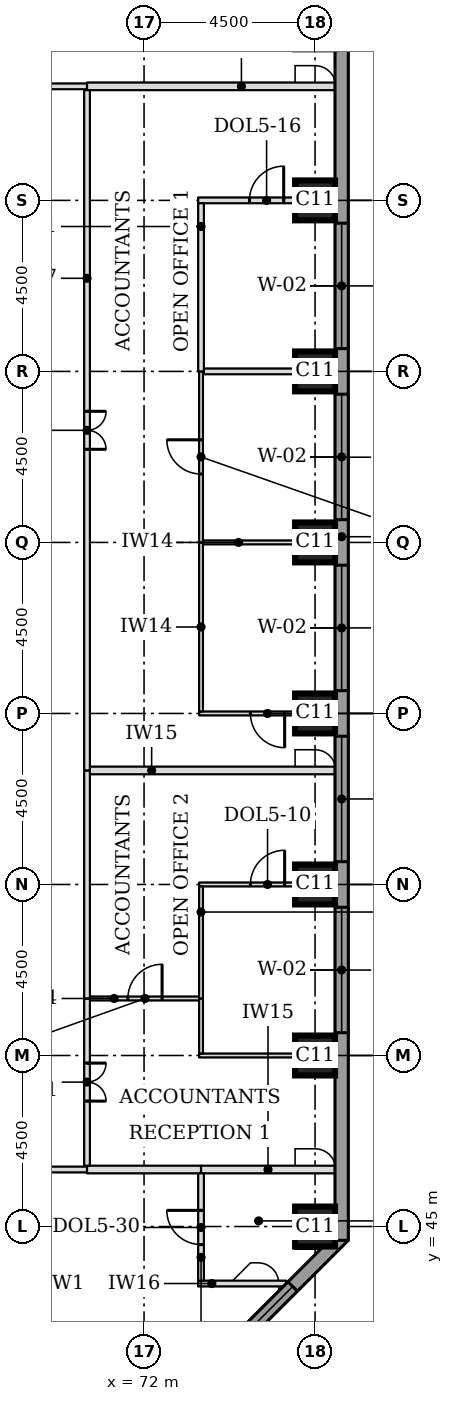
"""IFC4 building model, lengths in metres.
Left out: names, types, materials, properties, quantities, classifications, styles, units other than length and angle.
Written with IfcOpenShell. Run it as: python <this file> out.ifc"""

import sys

from ifc_helpers import new_model, si_unit, direction, frame, frame_2d, origin, origin_2d, place, context, subcontext, project, spatial, rectangle, extrude, element, fill, save


model = new_model("IFC4")
c1 = context("Model", 3, precision=1e-05, world=origin(), true_north=direction((0.0, 1.0)))
c2 = subcontext(c1, "Body", "Model", "MODEL_VIEW")
j1 = project(units=[si_unit("LENGTHUNIT", "METRE"), si_unit("PLANEANGLEUNIT", "RADIAN")], contexts=[c1])
p1 = place(None, origin())
s1 = spatial("IfcSite", under=j1, at=p1, CompositionType="ELEMENT")
p2 = place(p1, origin())
s2 = spatial("IfcBuilding", under=s1, at=p2, CompositionType="ELEMENT")
p3 = place(p2, frame((0.0, 0.0, 108.5)))
s3 = spatial("IfcBuildingStorey", under=s2, at=p3, CompositionType="ELEMENT", Elevation=108.5)
for number, where, z_axis, x_axis in (
    (1, (76.5, 45.0, 0.0), (0.0, 0.0, 1.0), (1.0, 0.0, 0.0)),
    (2, (76.5, 49.5, 0.0), (0.0, 0.0, 1.0), (1.0, 0.0, 0.0)),
    (3, (76.5, 54.0, 0.0), (0.0, 0.0, 1.0), (1.0, 0.0, 0.0)),
    (4, (76.5, 58.5, 0.0), (0.0, 0.0, 1.0), (1.0, 0.0, 0.0)),
    (5, (76.5, 63.0, 0.0), (0.0, 0.0, 1.0), (1.0, 0.0, 0.0)),
    (6, (76.5, 67.5, 0.0), (0.0, 0.0, 1.0), (1.0, 0.0, 0.0)),
    (7, (76.5, 72.0, 0.0), (0.0, 0.0, 1.0), (1.0, 0.0, 0.0)),
):
    element("IfcColumn", number, at=place(p3, frame(where, z_axis=z_axis, x_axis=x_axis)), inside=s3, PredefinedType="COLUMN", context=c2, shape_type="SweptSolid", body=[
        extrude(rectangle(XDim=1.05, YDim=1.05, at=origin_2d()), origin(), (0.0, 0.0, 1.0), 3.7),
    ])
p4 = place(p3, frame((72.239, 39.749, 0.0), z_axis=(0.0, 0.0, 1.0), x_axis=(0.707106781187, 0.707106781187, 0.0)))
e8 = element("IfcWall", 8, at=p4, inside=s3, PredefinedType="STANDARD", context=c2, shape_type="SweptSolid", body=[
    extrude(rectangle(XDim=7.089, YDim=0.35, at=frame_2d((3.544, 0.0))), origin(), (0.0, 0.0, 1.0), 3.525),
])
p5 = place(p4, frame((1.894, 0.0, 0.9)))
e9 = element("IfcOpeningElement", 9, at=p5, cuts=e8, PredefinedType="OPENING", context=c2, shape_type="SweptSolid", body=[
    extrude(rectangle(XDim=3.3, YDim=1.9, at=frame_2d((1.65, 0.95))), frame((0.0, 0.185, 0.0), z_axis=(0.0, -1.0, 0.0), x_axis=(1.0, 0.0, 0.0)), (0.0, 0.0, 1.0), 0.37),
])
p6 = place(p3, frame((77.2, 44.638, 0.0), z_axis=(0.0, 0.0, 1.0), x_axis=(0.0, 1.0, 0.0)))
e10 = element("IfcWall", 10, at=p6, inside=s3, PredefinedType="STANDARD", context=c2, shape_type="SweptSolid", body=[
    extrude(rectangle(XDim=32.225, YDim=0.35, at=frame_2d((16.112, 0.0))), origin(), (0.0, 0.0, 1.0), 3.525),
])
p7 = place(p6, frame((5.462, 0.0, 0.9)))
e11 = element("IfcOpeningElement", 11, at=p7, cuts=e10, PredefinedType="OPENING", context=c2, shape_type="SweptSolid", body=[
    extrude(rectangle(XDim=3.3, YDim=1.9, at=frame_2d((1.65, 0.95))), frame((0.0, 0.185, 0.0), z_axis=(0.0, -1.0, 0.0), x_axis=(1.0, 0.0, 0.0)), (0.0, 0.0, 1.0), 0.37),
])
p8 = place(p6, frame((9.962, 0.0, 0.9)))
e12 = element("IfcOpeningElement", 12, at=p8, cuts=e10, PredefinedType="OPENING", context=c2, shape_type="SweptSolid", body=[
    extrude(rectangle(XDim=3.3, YDim=1.9, at=frame_2d((1.65, 0.95))), frame((0.0, 0.185, 0.0), z_axis=(0.0, -1.0, 0.0), x_axis=(1.0, 0.0, 0.0)), (0.0, 0.0, 1.0), 0.37),
])
p9 = place(p6, frame((14.462, 0.0, 0.9)))
e13 = element("IfcOpeningElement", 13, at=p9, cuts=e10, PredefinedType="OPENING", context=c2, shape_type="SweptSolid", body=[
    extrude(rectangle(XDim=3.3, YDim=1.9, at=frame_2d((1.65, 0.95))), frame((0.0, 0.185, 0.0), z_axis=(0.0, -1.0, 0.0), x_axis=(1.0, 0.0, 0.0)), (0.0, 0.0, 1.0), 0.37),
])
p10 = place(p6, frame((18.962, 0.0, 0.9)))
e14 = element("IfcOpeningElement", 14, at=p10, cuts=e10, PredefinedType="OPENING", context=c2, shape_type="SweptSolid", body=[
    extrude(rectangle(XDim=3.3, YDim=1.9, at=frame_2d((1.65, 0.95))), frame((0.0, 0.185, 0.0), z_axis=(0.0, -1.0, 0.0), x_axis=(1.0, 0.0, 0.0)), (0.0, 0.0, 1.0), 0.37),
])
p11 = place(p6, frame((23.462, 0.0, 0.9)))
e15 = element("IfcOpeningElement", 15, at=p11, cuts=e10, PredefinedType="OPENING", context=c2, shape_type="SweptSolid", body=[
    extrude(rectangle(XDim=3.3, YDim=1.9, at=frame_2d((1.65, 0.95))), frame((0.0, 0.185, 0.0), z_axis=(0.0, -1.0, 0.0), x_axis=(1.0, 0.0, 0.0)), (0.0, 0.0, 1.0), 0.37),
])
p12 = place(p3, frame((73.425, 43.5, 0.0), z_axis=(0.0, 0.0, 1.0), x_axis=(1.0, 0.0, 0.0)))
e16 = element("IfcWall", 16, at=p12, inside=s3, PredefinedType="PARTITIONING", context=c2, shape_type="SweptSolid", body=[
    extrude(rectangle(XDim=2.317, YDim=0.15, at=frame_2d((1.159, 0.0))), origin(), (0.0, 0.0, 1.0), 3.55),
])
p13 = place(p3, frame((54.0, 46.5, 0.0), z_axis=(0.0, 0.0, 1.0), x_axis=(1.0, 0.0, 0.0)))
e17 = element("IfcWall", 17, at=p13, inside=s3, PredefinedType="PARTITIONING", context=c2, shape_type="SweptSolid", body=[
    extrude(rectangle(XDim=16.5, YDim=0.15, at=frame_2d((8.25, 0.0))), origin(), (0.0, 0.0, 1.0), 3.55),
])
p14 = place(p3, frame((70.5, 46.5, 0.0), z_axis=(0.0, 0.0, 1.0), x_axis=(1.0, 0.0, 0.0)))
e18 = element("IfcWall", 18, at=p14, inside=s3, PredefinedType="PARTITIONING", context=c2, shape_type="SweptSolid", body=[
    extrude(rectangle(XDim=3.0, YDim=0.2, at=frame_2d((1.5, 0.0))), origin(), (0.0, 0.0, 1.0), 3.55),
])
p15 = place(p3, frame((73.5, 46.5, 0.0), z_axis=(0.0, 0.0, 1.0), x_axis=(1.0, 0.0, 0.0)))
e19 = element("IfcWall", 19, at=p15, inside=s3, PredefinedType="PARTITIONING", context=c2, shape_type="SweptSolid", body=[
    extrude(rectangle(XDim=3.525, YDim=0.2, at=frame_2d((1.762, 0.0))), origin(), (0.0, 0.0, 1.0), 3.55),
])
p16 = place(p3, frame((73.45, 49.5, 0.0), z_axis=(0.0, 0.0, 1.0), x_axis=(1.0, 0.0, 0.0)))
e20 = element("IfcWall", 20, at=p16, inside=s3, PredefinedType="PARTITIONING", context=c2, shape_type="SweptSolid", body=[
    extrude(rectangle(XDim=3.575, YDim=0.1, at=frame_2d((1.788, 0.0))), origin(), (0.0, 0.0, 1.0), 3.55),
])
p17 = place(p3, frame((70.575, 51.0, 0.0), z_axis=(0.0, 0.0, 1.0), x_axis=(1.0, 0.0, 0.0)))
e21 = element("IfcWall", 21, at=p17, inside=s3, PredefinedType="PARTITIONING", context=c2, shape_type="SweptSolid", body=[
    extrude(rectangle(XDim=2.875, YDim=0.1, at=frame_2d((1.438, 0.0))), origin(), (0.0, 0.0, 1.0), 3.022),
])
p18 = place(p17, frame((1.0, 0.0, 0.0)))
e22 = element("IfcOpeningElement", 22, at=p18, cuts=e21, PredefinedType="OPENING", context=c2, shape_type="SweptSolid", body=[
    extrude(rectangle(XDim=0.9, YDim=2.1, at=frame_2d((0.45, 1.05))), frame((0.0, 0.06, 0.0), z_axis=(0.0, -1.0, 0.0), x_axis=(1.0, 0.0, 0.0)), (0.0, 0.0, 1.0), 0.12),
])
p19 = place(p3, frame((73.45, 54.0, 0.0), z_axis=(0.0, 0.0, 1.0), x_axis=(1.0, 0.0, 0.0)))
e23 = element("IfcWall", 23, at=p19, inside=s3, PredefinedType="PARTITIONING", context=c2, shape_type="SweptSolid", body=[
    extrude(rectangle(XDim=3.575, YDim=0.1, at=frame_2d((1.788, 0.0))), origin(), (0.0, 0.0, 1.0), 3.55),
])
p20 = place(p19, frame((1.35, 0.0, 0.0)))
e24 = element("IfcOpeningElement", 24, at=p20, cuts=e23, PredefinedType="OPENING", context=c2, shape_type="SweptSolid", body=[
    extrude(rectangle(XDim=0.9, YDim=2.1, at=frame_2d((0.45, 1.05))), frame((0.0, 0.06, 0.0), z_axis=(0.0, -1.0, 0.0), x_axis=(1.0, 0.0, 0.0)), (0.0, 0.0, 1.0), 0.12),
])
p21 = place(p3, frame((70.575, 57.0, 0.0), z_axis=(0.0, 0.0, 1.0), x_axis=(1.0, 0.0, 0.0)))
e25 = element("IfcWall", 25, at=p21, inside=s3, PredefinedType="PARTITIONING", context=c2, shape_type="SweptSolid", body=[
    extrude(rectangle(XDim=6.45, YDim=0.2, at=frame_2d((3.225, 0.0))), origin(), (0.0, 0.0, 1.0), 3.55),
])
p22 = place(p3, frame((73.45, 58.5, 0.0), z_axis=(0.0, 0.0, 1.0), x_axis=(1.0, 0.0, 0.0)))
e26 = element("IfcWall", 26, at=p22, inside=s3, PredefinedType="PARTITIONING", context=c2, shape_type="SweptSolid", body=[
    extrude(rectangle(XDim=3.575, YDim=0.1, at=frame_2d((1.788, 0.0))), origin(), (0.0, 0.0, 1.0), 3.55),
])
p23 = place(p22, frame((1.35, 0.0, 0.0)))
e27 = element("IfcOpeningElement", 27, at=p23, cuts=e26, PredefinedType="OPENING", context=c2, shape_type="SweptSolid", body=[
    extrude(rectangle(XDim=0.9, YDim=2.1, at=frame_2d((0.45, 1.05))), frame((0.0, 0.06, 0.0), z_axis=(0.0, -1.0, 0.0), x_axis=(1.0, 0.0, 0.0)), (0.0, 0.0, 1.0), 0.12),
])
p24 = place(p3, frame((73.55, 63.0, 0.0), z_axis=(0.0, 0.0, 1.0), x_axis=(1.0, 0.0, 0.0)))
e28 = element("IfcWall", 28, at=p24, inside=s3, PredefinedType="PARTITIONING", context=c2, shape_type="SweptSolid", body=[
    extrude(rectangle(XDim=3.475, YDim=0.1, at=frame_2d((1.737, 0.0))), origin(), (0.0, 0.0, 1.0), 3.55),
])
p25 = place(p3, frame((73.575, 67.5, 0.0), z_axis=(0.0, 0.0, 1.0), x_axis=(1.0, 0.0, 0.0)))
e29 = element("IfcWall", 29, at=p25, inside=s3, PredefinedType="PARTITIONING", context=c2, shape_type="SweptSolid", body=[
    extrude(rectangle(XDim=3.45, YDim=0.15, at=frame_2d((1.725, 0.0))), origin(), (0.0, 0.0, 1.0), 3.55),
])
p26 = place(p3, frame((73.425, 72.0, 0.0), z_axis=(0.0, 0.0, 1.0), x_axis=(1.0, 0.0, 0.0)))
e30 = element("IfcWall", 30, at=p26, inside=s3, PredefinedType="PARTITIONING", context=c2, shape_type="SweptSolid", body=[
    extrude(rectangle(XDim=3.6, YDim=0.15, at=frame_2d((1.8, 0.0))), origin(), (0.0, 0.0, 1.0), 3.55),
])
p27 = place(p26, frame((1.35, 0.0, 0.0)))
e31 = element("IfcOpeningElement", 31, at=p27, cuts=e30, PredefinedType="OPENING", context=c2, shape_type="SweptSolid", body=[
    extrude(rectangle(XDim=0.9, YDim=2.1, at=frame_2d((0.45, 1.05))), frame((0.0, 0.085, 0.0), z_axis=(0.0, -1.0, 0.0), x_axis=(1.0, 0.0, 0.0)), (0.0, 0.0, 1.0), 0.17),
])
p28 = place(p3, frame((63.0, 75.0, 0.0), z_axis=(0.0, 0.0, 1.0), x_axis=(1.0, 0.0, 0.0)))
e32 = element("IfcWall", 32, at=p28, inside=s3, PredefinedType="PARTITIONING", context=c2, shape_type="SweptSolid", body=[
    extrude(rectangle(XDim=7.5, YDim=0.15, at=frame_2d((3.75, 0.0))), origin(), (0.0, 0.0, 1.0), 3.55),
])
p29 = place(p28, frame((3.25, 0.0, 0.0)))
e33 = element("IfcOpeningElement", 33, at=p29, cuts=e32, PredefinedType="OPENING", context=c2, shape_type="SweptSolid", body=[
    extrude(rectangle(XDim=1.0, YDim=2.1, at=frame_2d((0.5, 1.05))), frame((0.0, 0.085, 0.0), z_axis=(0.0, -1.0, 0.0), x_axis=(1.0, 0.0, 0.0)), (0.0, 0.0, 1.0), 0.17),
])
p30 = place(p3, frame((70.5, 75.0, 0.0), z_axis=(0.0, 0.0, 1.0), x_axis=(1.0, 0.0, 0.0)))
e34 = element("IfcWall", 34, at=p30, inside=s3, PredefinedType="PARTITIONING", context=c2, shape_type="SweptSolid", body=[
    extrude(rectangle(XDim=6.525, YDim=0.2, at=frame_2d((3.262, 0.0))), origin(), (0.0, 0.0, 1.0), 3.55),
])
p31 = place(p3, frame((73.5, 43.575, 0.0), z_axis=(0.0, 0.0, 1.0), x_axis=(0.0, 1.0, 0.0)))
e35 = element("IfcWall", 35, at=p31, inside=s3, PredefinedType="PARTITIONING", context=c2, shape_type="SweptSolid", body=[
    extrude(rectangle(XDim=2.825, YDim=0.15, at=frame_2d((1.413, 0.0))), origin(), (0.0, 0.0, 1.0), 3.55),
])
p32 = place(p31, frame((0.95, 0.0, 0.0)))
e36 = element("IfcOpeningElement", 36, at=p32, cuts=e35, PredefinedType="OPENING", context=c2, shape_type="SweptSolid", body=[
    extrude(rectangle(XDim=0.9, YDim=2.1, at=frame_2d((0.45, 1.05))), frame((0.0, 0.085, 0.0), z_axis=(0.0, -1.0, 0.0), x_axis=(1.0, 0.0, 0.0)), (0.0, 0.0, 1.0), 0.17),
])
p33 = place(p3, frame((70.5, 46.6, 0.0), z_axis=(0.0, 0.0, 1.0), x_axis=(0.0, 1.0, 0.0)))
e37 = element("IfcWall", 37, at=p33, inside=s3, PredefinedType="PARTITIONING", context=c2, shape_type="SweptSolid", body=[
    extrude(rectangle(XDim=4.4, YDim=0.15, at=frame_2d((2.2, 0.0))), origin(), (0.0, 0.0, 1.0), 3.55),
])
p34 = place(p33, frame((1.7, 0.0, 0.0)))
e38 = element("IfcOpeningElement", 38, at=p34, cuts=e37, PredefinedType="OPENING", context=c2, shape_type="SweptSolid", body=[
    extrude(rectangle(XDim=1.0, YDim=2.1, at=frame_2d((0.5, 1.05))), frame((0.0, 0.085, 0.0), z_axis=(0.0, -1.0, 0.0), x_axis=(1.0, 0.0, 0.0)), (0.0, 0.0, 1.0), 0.17),
])
p35 = place(p3, frame((73.5, 49.55, 0.0), z_axis=(0.0, 0.0, 1.0), x_axis=(0.0, 1.0, 0.0)))
e39 = element("IfcWall", 39, at=p35, inside=s3, PredefinedType="PARTITIONING", context=c2, shape_type="SweptSolid", body=[
    extrude(rectangle(XDim=1.45, YDim=0.1, at=frame_2d((0.725, 0.0))), origin(), (0.0, 0.0, 1.0), 3.55),
])
p36 = place(p3, frame((70.5, 51.0, 0.0), z_axis=(0.0, 0.0, 1.0), x_axis=(0.0, 1.0, 0.0)))
e40 = element("IfcWall", 40, at=p36, inside=s3, PredefinedType="PARTITIONING", context=c2, shape_type="SweptSolid", body=[
    extrude(rectangle(XDim=6.0, YDim=0.15, at=frame_2d((3.0, 0.0))), origin(), (0.0, 0.0, 1.0), 3.55),
])
p37 = place(p3, frame((73.5, 51.0, 0.0), z_axis=(0.0, 0.0, 1.0), x_axis=(0.0, 1.0, 0.0)))
e41 = element("IfcWall", 41, at=p37, inside=s3, PredefinedType="PARTITIONING", context=c2, shape_type="SweptSolid", body=[
    extrude(rectangle(XDim=2.95, YDim=0.1, at=frame_2d((1.475, 0.0))), origin(), (0.0, 0.0, 1.0), 3.55),
])
p38 = place(p3, frame((70.5, 57.0, 0.0), z_axis=(0.0, 0.0, 1.0), x_axis=(0.0, 1.0, 0.0)))
e42 = element("IfcWall", 42, at=p38, inside=s3, PredefinedType="PARTITIONING", context=c2, shape_type="SweptSolid", body=[
    extrude(rectangle(XDim=17.9, YDim=0.15, at=frame_2d((8.95, 0.0))), origin(), (0.0, 0.0, 1.0), 3.55),
])
p39 = place(p38, frame((8.45, 0.0, 0.0)))
e43 = element("IfcOpeningElement", 43, at=p39, cuts=e42, PredefinedType="OPENING", context=c2, shape_type="SweptSolid", body=[
    extrude(rectangle(XDim=1.0, YDim=2.1, at=frame_2d((0.5, 1.05))), frame((0.0, 0.085, 0.0), z_axis=(0.0, -1.0, 0.0), x_axis=(1.0, 0.0, 0.0)), (0.0, 0.0, 1.0), 0.17),
])
p40 = place(p3, frame((73.5, 58.55, 0.0), z_axis=(0.0, 0.0, 1.0), x_axis=(0.0, 1.0, 0.0)))
e44 = element("IfcWall", 44, at=p40, inside=s3, PredefinedType="PARTITIONING", context=c2, shape_type="SweptSolid", body=[
    extrude(rectangle(XDim=4.45, YDim=0.1, at=frame_2d((2.225, 0.0))), origin(), (0.0, 0.0, 1.0), 3.55),
])
p41 = place(p3, frame((73.5, 63.0, 0.0), z_axis=(0.0, 0.0, 1.0), x_axis=(0.0, 1.0, 0.0)))
e45 = element("IfcWall", 45, at=p41, inside=s3, PredefinedType="PARTITIONING", context=c2, shape_type="SweptSolid", body=[
    extrude(rectangle(XDim=4.5, YDim=0.1, at=frame_2d((2.25, 0.0))), origin(), (0.0, 0.0, 1.0), 3.55),
])
p42 = place(p41, frame((1.8, 0.0, 0.0)))
e46 = element("IfcOpeningElement", 46, at=p42, cuts=e45, PredefinedType="OPENING", context=c2, shape_type="SweptSolid", body=[
    extrude(rectangle(XDim=0.9, YDim=2.1, at=frame_2d((0.45, 1.05))), frame((0.0, 0.06, 0.0), z_axis=(0.0, -1.0, 0.0), x_axis=(1.0, 0.0, 0.0)), (0.0, 0.0, 1.0), 0.12),
])
p43 = place(p3, frame((73.5, 67.5, 0.0), z_axis=(0.0, 0.0, 1.0), x_axis=(0.0, 1.0, 0.0)))
e47 = element("IfcWall", 47, at=p43, inside=s3, PredefinedType="PARTITIONING", context=c2, shape_type="SweptSolid", body=[
    extrude(rectangle(XDim=4.425, YDim=0.15, at=frame_2d((2.212, 0.0))), origin(), (0.0, 0.0, 1.0), 3.55),
])
p44 = place(p5, origin())
e48 = element("IfcWindow", 48, at=p44, inside=s3, PartitioningType="SINGLE_PANEL", PredefinedType="WINDOW", context=c2, shape_type="SweptSolid", body=[
    extrude(rectangle(XDim=3.3, YDim=1.9, at=frame_2d((1.65, 0.95))), frame((0.0, 0.085, 0.0), z_axis=(0.0, -1.0, 0.0), x_axis=(1.0, 0.0, 0.0)), (0.0, 0.0, 1.0), 0.06),
])
fill(e9, e48)
p45 = place(p7, origin())
e49 = element("IfcWindow", 49, at=p45, inside=s3, PartitioningType="SINGLE_PANEL", PredefinedType="WINDOW", context=c2, shape_type="SweptSolid", body=[
    extrude(rectangle(XDim=3.3, YDim=1.9, at=frame_2d((1.65, 0.95))), frame((0.0, 0.085, 0.0), z_axis=(0.0, -1.0, 0.0), x_axis=(1.0, 0.0, 0.0)), (0.0, 0.0, 1.0), 0.06),
])
fill(e11, e49)
p46 = place(p8, origin())
e50 = element("IfcWindow", 50, at=p46, inside=s3, PartitioningType="SINGLE_PANEL", PredefinedType="WINDOW", context=c2, shape_type="SweptSolid", body=[
    extrude(rectangle(XDim=3.3, YDim=1.9, at=frame_2d((1.65, 0.95))), frame((0.0, 0.085, 0.0), z_axis=(0.0, -1.0, 0.0), x_axis=(1.0, 0.0, 0.0)), (0.0, 0.0, 1.0), 0.06),
])
fill(e12, e50)
p47 = place(p9, origin())
e51 = element("IfcWindow", 51, at=p47, inside=s3, PartitioningType="SINGLE_PANEL", PredefinedType="WINDOW", context=c2, shape_type="SweptSolid", body=[
    extrude(rectangle(XDim=3.3, YDim=1.9, at=frame_2d((1.65, 0.95))), frame((0.0, 0.085, 0.0), z_axis=(0.0, -1.0, 0.0), x_axis=(1.0, 0.0, 0.0)), (0.0, 0.0, 1.0), 0.06),
])
fill(e13, e51)
p48 = place(p10, origin())
e52 = element("IfcWindow", 52, at=p48, inside=s3, PartitioningType="SINGLE_PANEL", PredefinedType="WINDOW", context=c2, shape_type="SweptSolid", body=[
    extrude(rectangle(XDim=3.3, YDim=1.9, at=frame_2d((1.65, 0.95))), frame((0.0, 0.085, 0.0), z_axis=(0.0, -1.0, 0.0), x_axis=(1.0, 0.0, 0.0)), (0.0, 0.0, 1.0), 0.06),
])
fill(e14, e52)
p49 = place(p11, origin())
e53 = element("IfcWindow", 53, at=p49, inside=s3, PartitioningType="SINGLE_PANEL", PredefinedType="WINDOW", context=c2, shape_type="SweptSolid", body=[
    extrude(rectangle(XDim=3.3, YDim=1.9, at=frame_2d((1.65, 0.95))), frame((0.0, 0.085, 0.0), z_axis=(0.0, -1.0, 0.0), x_axis=(1.0, 0.0, 0.0)), (0.0, 0.0, 1.0), 0.06),
])
fill(e15, e53)
p50 = place(p32, origin())
e54 = element("IfcDoor", 54, at=p50, inside=s3, OperationType="SINGLE_SWING_RIGHT", PredefinedType="DOOR", context=c2, shape_type="SweptSolid", body=[
    extrude(rectangle(XDim=0.9, YDim=2.1, at=frame_2d((0.45, 1.05))), frame((0.0, 0.025, 0.0), z_axis=(0.0, -1.0, 0.0), x_axis=(1.0, 0.0, 0.0)), (0.0, 0.0, 1.0), 0.05),
])
fill(e36, e54)
p51 = place(p34, frame((1.0, 0.0, 0.0), z_axis=(0.0, 0.0, 1.0), x_axis=(-1.0, 0.0, 0.0)))
e55 = element("IfcDoor", 55, at=p51, inside=s3, OperationType="DOUBLE_DOOR_SINGLE_SWING", PredefinedType="DOOR", context=c2, shape_type="SweptSolid", body=[
    extrude(rectangle(XDim=1.0, YDim=2.1, at=frame_2d((0.5, 1.05))), frame((0.0, 0.025, 0.0), z_axis=(0.0, -1.0, 0.0), x_axis=(1.0, 0.0, 0.0)), (0.0, 0.0, 1.0), 0.05),
])
fill(e38, e55)
p52 = place(p18, origin())
e56 = element("IfcDoor", 56, at=p52, inside=s3, OperationType="SINGLE_SWING_RIGHT", PredefinedType="DOOR", context=c2, shape_type="SweptSolid", body=[
    extrude(rectangle(XDim=0.9, YDim=2.1, at=frame_2d((0.45, 1.05))), frame((0.0, 0.025, 0.0), z_axis=(0.0, -1.0, 0.0), x_axis=(1.0, 0.0, 0.0)), (0.0, 0.0, 1.0), 0.05),
])
fill(e22, e56)
p53 = place(p20, origin())
e57 = element("IfcDoor", 57, at=p53, inside=s3, OperationType="SINGLE_SWING_RIGHT", PredefinedType="DOOR", context=c2, shape_type="SweptSolid", body=[
    extrude(rectangle(XDim=0.9, YDim=2.1, at=frame_2d((0.45, 1.05))), frame((0.0, 0.025, 0.0), z_axis=(0.0, -1.0, 0.0), x_axis=(1.0, 0.0, 0.0)), (0.0, 0.0, 1.0), 0.05),
])
fill(e24, e57)
p54 = place(p39, frame((1.0, 0.0, 0.0), z_axis=(0.0, 0.0, 1.0), x_axis=(-1.0, 0.0, 0.0)))
e58 = element("IfcDoor", 58, at=p54, inside=s3, OperationType="DOUBLE_DOOR_SINGLE_SWING", PredefinedType="DOOR", context=c2, shape_type="SweptSolid", body=[
    extrude(rectangle(XDim=1.0, YDim=2.1, at=frame_2d((0.5, 1.05))), frame((0.0, 0.025, 0.0), z_axis=(0.0, -1.0, 0.0), x_axis=(1.0, 0.0, 0.0)), (0.0, 0.0, 1.0), 0.05),
])
fill(e43, e58)
p55 = place(p23, frame((0.9, 0.0, 0.0), z_axis=(0.0, 0.0, 1.0), x_axis=(-1.0, 0.0, 0.0)))
e59 = element("IfcDoor", 59, at=p55, inside=s3, OperationType="SINGLE_SWING_LEFT", PredefinedType="DOOR", context=c2, shape_type="SweptSolid", body=[
    extrude(rectangle(XDim=0.9, YDim=2.1, at=frame_2d((0.45, 1.05))), frame((0.0, 0.025, 0.0), z_axis=(0.0, -1.0, 0.0), x_axis=(1.0, 0.0, 0.0)), (0.0, 0.0, 1.0), 0.05),
])
fill(e27, e59)
p56 = place(p42, origin())
e60 = element("IfcDoor", 60, at=p56, inside=s3, OperationType="SINGLE_SWING_RIGHT", PredefinedType="DOOR", context=c2, shape_type="SweptSolid", body=[
    extrude(rectangle(XDim=0.9, YDim=2.1, at=frame_2d((0.45, 1.05))), frame((0.0, 0.025, 0.0), z_axis=(0.0, -1.0, 0.0), x_axis=(1.0, 0.0, 0.0)), (0.0, 0.0, 1.0), 0.05),
])
fill(e46, e60)
p57 = place(p27, origin())
e61 = element("IfcDoor", 61, at=p57, inside=s3, OperationType="SINGLE_SWING_RIGHT", PredefinedType="DOOR", context=c2, shape_type="SweptSolid", body=[
    extrude(rectangle(XDim=0.9, YDim=2.1, at=frame_2d((0.45, 1.05))), frame((0.0, 0.025, 0.0), z_axis=(0.0, -1.0, 0.0), x_axis=(1.0, 0.0, 0.0)), (0.0, 0.0, 1.0), 0.05),
])
fill(e31, e61)
save(model, sys.argv[1])
